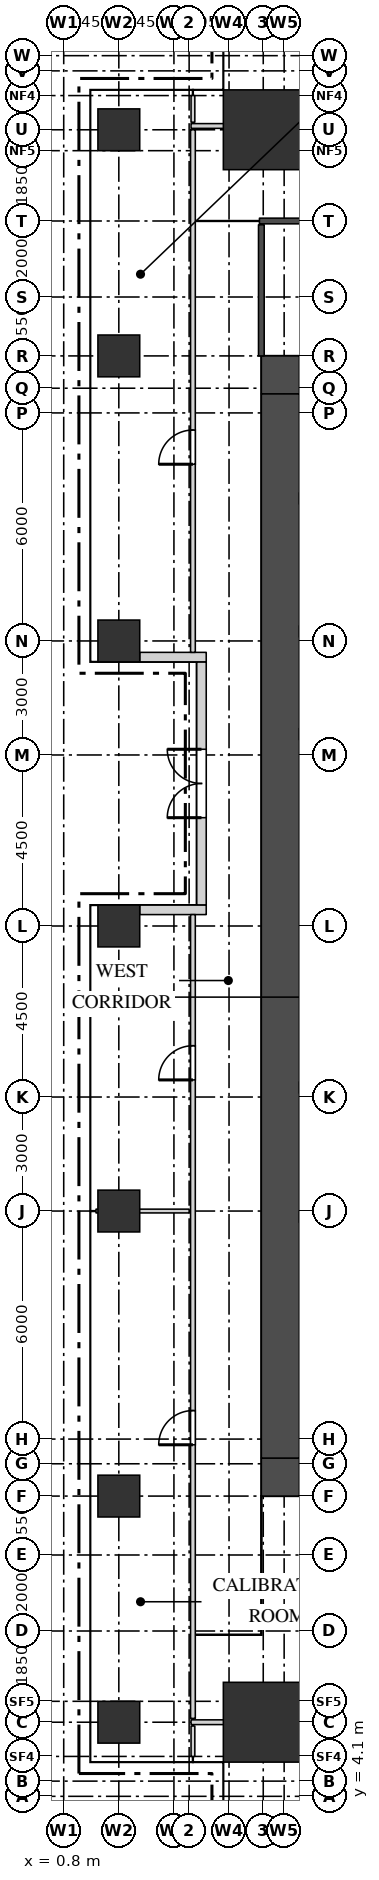
"""IFC4 building model, lengths in metres.
Left out: names, types, materials, properties, quantities, classifications, styles, units other than length and angle.
Written with IfcOpenShell. Run it as: python <this file> out.ifc"""

import sys

from ifc_helpers import new_model, si_unit, direction, frame, frame_2d, origin, origin_2d, place, context, subcontext, project, spatial, rectangle, extrude, source, transform, mapped, element, fill, save


model = new_model("IFC4")
c1 = context("Model", 3, precision=1e-05, world=origin(), true_north=direction((0.0, 1.0)))
c2 = subcontext(c1, "Body", "Model", "MODEL_VIEW")
j1 = project(units=[si_unit("LENGTHUNIT", "METRE"), si_unit("PLANEANGLEUNIT", "RADIAN")], contexts=[c1])
p1 = place(None, origin())
s1 = spatial("IfcSite", under=j1, at=p1, CompositionType="ELEMENT")
p2 = place(p1, origin())
s2 = spatial("IfcBuilding", under=s1, at=p2, CompositionType="ELEMENT")
p3 = place(p2, frame((0.0, 0.0, 127.9)))
s3 = spatial("IfcBuildingStorey", under=s2, at=p3, CompositionType="ELEMENT", Elevation=127.9)
m1 = source(origin(), c2, "Body", "SweptSolid", [
    extrude(rectangle(XDim=1.0, YDim=1.0, at=frame_2d((0.5, 0.0))), origin(), (0.0, 0.0, 1.0), 4.1),
])
for number, where, z_axis, x_axis in (
    (1, (6.0, 41.5, 0.0), (0.0, 0.0, 1.0), (1.0, 0.0, 0.0)),
    (2, (6.0, 12.5, 0.0), (0.0, 0.0, 1.0), (1.0, 0.0, 0.0)),
):
    element("IfcWall", number, at=place(p3, frame(where, z_axis=z_axis, x_axis=x_axis)), inside=s3, PredefinedType="SHEAR", context=c2, shape_type="MappedRepresentation", body=[
        mapped(m1, transform((0.0, 0.0, 0.0))),
    ])
m2 = source(origin(), c2, "Body", "SweptSolid", [
    extrude(rectangle(XDim=28.0, YDim=1.0, at=frame_2d((14.0, 0.0))), origin(), (0.0, 0.0, 1.0), 4.1),
])
p4 = place(p3, frame((6.5, 13.0, 0.0), z_axis=(0.0, 0.0, 1.0), x_axis=(0.0, 1.0, 0.0)))
e3 = element("IfcWall", 3, at=p4, inside=s3, PredefinedType="SHEAR", context=c2, shape_type="MappedRepresentation", body=[
    mapped(m2, transform((0.0, 0.0, 0.0))),
])
m3 = source(origin(), c2, "Body", "SweptSolid", [
    extrude(rectangle(XDim=2.1, YDim=2.1, at=origin_2d()), origin(), (0.0, 0.0, 1.0), 4.4),
])
for number, where, z_axis, x_axis in (
    (4, (6.05, 47.95, 0.0), (0.0, 0.0, 1.0), (1.0, 0.0, 0.0)),
    (5, (6.05, 6.05, 0.0), (0.0, 0.0, 1.0), (1.0, 0.0, 0.0)),
):
    element("IfcColumn", number, at=place(p3, frame(where, z_axis=z_axis, x_axis=x_axis)), inside=s3, PredefinedType="COLUMN", context=c2, shape_type="MappedRepresentation", body=[
        mapped(m3, transform((0.0, 0.0, 0.0))),
    ])
m4 = source(origin(), c2, "Body", "SweptSolid", [
    extrude(rectangle(XDim=1.1, YDim=1.1, at=origin_2d()), origin(), (0.0, 0.0, 1.0), 4.1),
])
for number, where, z_axis, x_axis in (
    (6, (2.25, 6.05, 0.0), (0.0, 0.0, 1.0), (1.0, 0.0, 0.0)),
    (7, (2.25, 12.0, 0.0), (0.0, 0.0, 1.0), (1.0, 0.0, 0.0)),
    (8, (2.25, 19.5, 0.0), (0.0, 0.0, 1.0), (1.0, 0.0, 0.0)),
    (9, (2.25, 27.0, 0.0), (0.0, 0.0, 1.0), (1.0, 0.0, 0.0)),
    (10, (2.25, 34.5, 0.0), (0.0, 0.0, 1.0), (1.0, 0.0, 0.0)),
    (11, (2.25, 42.0, 0.0), (0.0, 0.0, 1.0), (1.0, 0.0, 0.0)),
    (12, (2.25, 47.95, 0.0), (0.0, 0.0, 1.0), (1.0, 0.0, 0.0)),
):
    element("IfcColumn", number, at=place(p3, frame(where, z_axis=z_axis, x_axis=x_axis)), inside=s3, PredefinedType="COLUMN", context=c2, shape_type="MappedRepresentation", body=[
        mapped(m4, transform((0.0, 0.0, 0.0))),
    ])
m5 = source(origin(), c2, "Body", "SweptSolid", [
    extrude(rectangle(XDim=6.4, YDim=0.25, at=frame_2d((3.2, 0.0))), origin(), (0.0, 0.0, 1.0), 3.5),
])
p5 = place(p3, frame((4.425, 27.55, 0.0), z_axis=(0.0, 0.0, 1.0), x_axis=(0.0, 1.0, 0.0)))
e13 = element("IfcWall", 13, at=p5, inside=s3, PredefinedType="SOLIDWALL", context=c2, shape_type="MappedRepresentation", body=[
    mapped(m5, transform((0.0, 0.0, 0.0))),
])
m6 = source(origin(), c2, "Body", "SweptSolid", [
    extrude(rectangle(XDim=1.65, YDim=2.4, at=frame_2d((0.825, 1.2))), frame((0.0, 0.135, 0.0), z_axis=(0.0, -1.0, 0.0), x_axis=(1.0, 0.0, 0.0)), (0.0, 0.0, 1.0), 0.27),
])
p6 = place(p5, frame((0.35, 0.0, 0.0)))
e14 = element("IfcOpeningElement", 14, at=p6, cuts=e13, PredefinedType="OPENING", context=c2, shape_type="MappedRepresentation", body=[
    mapped(m6, transform((0.0, 0.0, 0.0))),
])
p7 = place(p5, frame((4.4, 0.0, 0.0)))
e15 = element("IfcOpeningElement", 15, at=p7, cuts=e13, PredefinedType="OPENING", context=c2, shape_type="MappedRepresentation", body=[
    mapped(m6, transform((0.0, 0.0, 0.0))),
])
m7 = source(origin(), c2, "Body", "SweptSolid", [
    extrude(rectangle(XDim=1.8, YDim=2.4, at=frame_2d((0.9, 1.2))), frame((0.0, 0.135, 0.0), z_axis=(0.0, -1.0, 0.0), x_axis=(1.0, 0.0, 0.0)), (0.0, 0.0, 1.0), 0.27),
])
p8 = place(p5, frame((2.3, 0.0, 0.0)))
e16 = element("IfcOpeningElement", 16, at=p8, cuts=e13, PredefinedType="OPENING", context=c2, shape_type="MappedRepresentation", body=[
    mapped(m7, transform((0.0, 0.0, 0.0))),
])
m8 = source(origin(), c2, "Body", "SweptSolid", [
    extrude(rectangle(XDim=1.75, YDim=0.25, at=frame_2d((0.875, 0.0))), origin(), (0.0, 0.0, 1.0), 3.5),
])
for number, where, z_axis, x_axis in (
    (17, (2.8, 27.425, 0.0), (0.0, 0.0, 1.0), (1.0, 0.0, 0.0)),
    (18, (2.8, 34.075, 0.0), (0.0, 0.0, 1.0), (1.0, 0.0, 0.0)),
):
    element("IfcWall", number, at=place(p3, frame(where, z_axis=z_axis, x_axis=x_axis)), inside=s3, PredefinedType="SOLIDWALL", context=c2, shape_type="MappedRepresentation", body=[
        mapped(m8, transform((0.0, 0.0, 0.0))),
    ])
m9 = source(origin(), c2, "Body", "SweptSolid", [
    extrude(rectangle(XDim=0.8, YDim=0.1, at=frame_2d((0.4, 0.0))), origin(), (0.0, 0.0, 1.0), 4.2),
])
p9 = place(p3, frame((4.2, 5.15, 0.0), z_axis=(0.0, 0.0, 1.0), x_axis=(0.0, 1.0, 0.0)))
e19 = element("IfcWall", 19, at=p9, inside=s3, PredefinedType="PARTITIONING", context=c2, shape_type="MappedRepresentation", body=[
    mapped(m9, transform((0.0, 0.0, 0.0))),
])
m10 = source(origin(), c2, "Body", "SweptSolid", [
    extrude(rectangle(XDim=22.3, YDim=0.125, at=frame_2d((11.15, 0.0))), origin(), (0.0, 0.0, 1.0), 3.55),
])
p10 = place(p3, frame((4.15, 6.05, 0.0), z_axis=(0.0, 0.0, 1.0), x_axis=(1.0, 0.0, 0.0)))
e20 = element("IfcWall", 20, at=p10, inside=s3, PredefinedType="PARTITIONING", context=c2, shape_type="MappedRepresentation", body=[
    mapped(m10, transform((0.0, 0.0, 0.0))),
])
m11 = source(origin(), c2, "Body", "SweptSolid", [
    extrude(rectangle(XDim=0.9, YDim=2.1, at=frame_2d((0.45, 1.05))), frame((0.0, 0.073, 0.0), z_axis=(0.0, -1.0, 0.0), x_axis=(1.0, 0.0, 0.0)), (0.0, 0.0, 1.0), 0.145),
])
p11 = place(p10, frame((10.7, 0.0, 0.0)))
e21 = element("IfcOpeningElement", 21, at=p11, cuts=e20, PredefinedType="OPENING", context=c2, shape_type="MappedRepresentation", body=[
    mapped(m11, transform((0.0, 0.0, 0.0))),
])
m12 = source(origin(), c2, "Body", "SweptSolid", [
    extrude(rectangle(XDim=21.15, YDim=0.125, at=frame_2d((10.575, 0.0))), origin(), (0.0, 0.0, 1.0), 4.2),
])
p12 = place(p3, frame((4.2, 6.15, 0.0), z_axis=(0.0, 0.0, 1.0), x_axis=(0.0, 1.0, 0.0)))
e22 = element("IfcWall", 22, at=p12, inside=s3, PredefinedType="PARTITIONING", context=c2, shape_type="MappedRepresentation", body=[
    mapped(m12, transform((0.0, 0.0, 0.0))),
])
p13 = place(p12, frame((7.2, 0.0, 0.0)))
e23 = element("IfcOpeningElement", 23, at=p13, cuts=e22, PredefinedType="OPENING", context=c2, shape_type="MappedRepresentation", body=[
    mapped(m11, transform((0.0, 0.0, 0.0))),
])
p14 = place(p12, frame((16.8, 0.0, 0.0)))
e24 = element("IfcOpeningElement", 24, at=p14, cuts=e22, PredefinedType="OPENING", context=c2, shape_type="MappedRepresentation", body=[
    mapped(m11, transform((0.0, 0.0, 0.0))),
])
m13 = source(origin(), c2, "Body", "SweptSolid", [
    extrude(rectangle(XDim=2.45, YDim=0.1, at=frame_2d((1.225, 0.0))), origin(), (0.0, 0.0, 1.0), 4.2),
])
p15 = place(p3, frame((1.65, 19.5, 0.0), z_axis=(0.0, 0.0, 1.0), x_axis=(1.0, 0.0, 0.0)))
e25 = element("IfcWall", 25, at=p15, inside=s3, PredefinedType="PARTITIONING", context=c2, shape_type="MappedRepresentation", body=[
    mapped(m13, transform((0.0, 0.0, 0.0))),
])
m14 = source(origin(), c2, "Body", "SweptSolid", [
    extrude(rectangle(XDim=13.75, YDim=0.125, at=frame_2d((6.875, 0.0))), origin(), (0.0, 0.0, 1.0), 4.2),
])
p16 = place(p3, frame((4.2, 34.2, 0.0), z_axis=(0.0, 0.0, 1.0), x_axis=(0.0, 1.0, 0.0)))
e26 = element("IfcWall", 26, at=p16, inside=s3, PredefinedType="PARTITIONING", context=c2, shape_type="MappedRepresentation", body=[
    mapped(m14, transform((0.0, 0.0, 0.0))),
])
p17 = place(p16, frame((4.95, 0.0, 0.0)))
e27 = element("IfcOpeningElement", 27, at=p17, cuts=e26, PredefinedType="OPENING", context=c2, shape_type="MappedRepresentation", body=[
    mapped(m11, transform((0.0, 0.0, 0.0))),
])
m15 = source(origin(), c2, "Body", "SweptSolid", [
    extrude(rectangle(XDim=3.45, YDim=0.15, at=frame_2d((1.725, 0.0))), origin(), (0.0, 0.0, 1.0), 4.2),
])
p18 = place(p3, frame((6.0, 42.0, 0.0), z_axis=(0.0, 0.0, 1.0), x_axis=(0.0, 1.0, 0.0)))
e28 = element("IfcWall", 28, at=p18, inside=s3, PredefinedType="PARTITIONING", context=c2, shape_type="MappedRepresentation", body=[
    mapped(m15, transform((0.0, 0.0, 0.0))),
])
m16 = source(origin(), c2, "Body", "SweptSolid", [
    extrude(rectangle(XDim=7.95, YDim=0.15, at=frame_2d((3.975, 0.0))), origin(), (0.0, 0.0, 1.0), 4.2),
])
p19 = place(p3, frame((5.95, 45.55, 0.0), z_axis=(0.0, 0.0, 1.0), x_axis=(1.0, 0.0, 0.0)))
e29 = element("IfcWall", 29, at=p19, inside=s3, PredefinedType="PARTITIONING", context=c2, shape_type="MappedRepresentation", body=[
    mapped(m16, transform((0.0, 0.0, 0.0))),
])
m17 = source(origin(), c2, "Body", "SweptSolid", [
    extrude(rectangle(XDim=0.9, YDim=2.1, at=frame_2d((0.45, 1.05))), frame((0.0, 0.085, 0.0), z_axis=(0.0, -1.0, 0.0), x_axis=(1.0, 0.0, 0.0)), (0.0, 0.0, 1.0), 0.17),
])
p20 = place(p19, frame((3.55, 0.0, 0.0)))
e30 = element("IfcOpeningElement", 30, at=p20, cuts=e29, PredefinedType="OPENING", context=c2, shape_type="MappedRepresentation", body=[
    mapped(m17, transform((0.0, 0.0, 0.0))),
])
m18 = source(origin(), c2, "Body", "SweptSolid", [
    extrude(rectangle(XDim=42.2, YDim=0.125, at=frame_2d((21.1, 0.0))), origin(), (0.0, 0.0, 1.0), 3.55),
])
p21 = place(p3, frame((4.15, 48.05, 0.0), z_axis=(0.0, 0.0, 1.0), x_axis=(1.0, 0.0, 0.0)))
e31 = element("IfcWall", 31, at=p21, inside=s3, PredefinedType="PARTITIONING", context=c2, shape_type="MappedRepresentation", body=[
    mapped(m18, transform((0.0, 0.0, 0.0))),
])
p22 = place(p21, frame((11.0, 0.0, 0.0)))
e32 = element("IfcOpeningElement", 32, at=p22, cuts=e31, PredefinedType="OPENING", context=c2, shape_type="MappedRepresentation", body=[
    mapped(m11, transform((0.0, 0.0, 0.0))),
])
p23 = place(p21, frame((32.1, 0.0, 0.0)))
e33 = element("IfcOpeningElement", 33, at=p23, cuts=e31, PredefinedType="OPENING", context=c2, shape_type="MappedRepresentation", body=[
    mapped(m11, transform((0.0, 0.0, 0.0))),
])
m19 = source(origin(), c2, "Body", "SweptSolid", [
    extrude(rectangle(XDim=0.7, YDim=0.1, at=frame_2d((0.35, 0.0))), origin(), (0.0, 0.0, 1.0), 4.2),
])
p24 = place(p3, frame((4.2, 48.15, 0.0), z_axis=(0.0, 0.0, 1.0), x_axis=(0.0, 1.0, 0.0)))
e34 = element("IfcWall", 34, at=p24, inside=s3, PredefinedType="PARTITIONING", context=c2, shape_type="MappedRepresentation", body=[
    mapped(m19, transform((0.0, 0.0, 0.0))),
])
m20 = source(origin(), c2, "Body", "SweptSolid", [
    extrude(rectangle(XDim=1.65, YDim=2.4, at=frame_2d((0.825, 1.2))), frame((0.0, 0.03, 0.0), z_axis=(0.0, -1.0, 0.0), x_axis=(1.0, 0.0, 0.0)), (0.0, 0.0, 1.0), 0.06),
])
p25 = place(p6, origin())
e35 = element("IfcWindow", 35, at=p25, inside=s3, PartitioningType="SINGLE_PANEL", PredefinedType="WINDOW", context=c2, shape_type="MappedRepresentation", body=[
    mapped(m20, transform((0.0, 0.0, 0.0))),
])
fill(e14, e35)
p26 = place(p7, origin())
e36 = element("IfcWindow", 36, at=p26, inside=s3, PartitioningType="SINGLE_PANEL", PredefinedType="WINDOW", context=c2, shape_type="MappedRepresentation", body=[
    mapped(m20, transform((0.0, 0.0, 0.0))),
])
fill(e15, e36)
m21 = source(origin(), c2, "Body", "SweptSolid", [
    extrude(rectangle(XDim=1.8, YDim=2.4, at=frame_2d((0.9, 1.2))), frame((0.0, 0.025, 0.0), z_axis=(0.0, -1.0, 0.0), x_axis=(1.0, 0.0, 0.0)), (0.0, 0.0, 1.0), 0.05),
])
p27 = place(p8, origin())
e37 = element("IfcDoor", 37, at=p27, inside=s3, OperationType="DOUBLE_DOOR_DOUBLE_SWING", PredefinedType="DOOR", context=c2, shape_type="MappedRepresentation", body=[
    mapped(m21, transform((0.0, 0.0, 0.0))),
])
fill(e16, e37)
m22 = source(origin(), c2, "Body", "SweptSolid", [
    extrude(rectangle(XDim=0.9, YDim=2.1, at=frame_2d((0.45, 1.05))), frame((0.0, 0.025, 0.0), z_axis=(0.0, -1.0, 0.0), x_axis=(1.0, 0.0, 0.0)), (0.0, 0.0, 1.0), 0.05),
])
p28 = place(p13, origin())
e38 = element("IfcDoor", 38, at=p28, inside=s3, OperationType="SINGLE_SWING_RIGHT", PredefinedType="DOOR", context=c2, shape_type="MappedRepresentation", body=[
    mapped(m22, transform((0.0, 0.0, 0.0))),
])
fill(e23, e38)
p29 = place(p14, origin())
e39 = element("IfcDoor", 39, at=p29, inside=s3, OperationType="SINGLE_SWING_RIGHT", PredefinedType="DOOR", context=c2, shape_type="MappedRepresentation", body=[
    mapped(m22, transform((0.0, 0.0, 0.0))),
])
fill(e24, e39)
p30 = place(p17, origin())
e40 = element("IfcDoor", 40, at=p30, inside=s3, OperationType="SINGLE_SWING_RIGHT", PredefinedType="DOOR", context=c2, shape_type="MappedRepresentation", body=[
    mapped(m22, transform((0.0, 0.0, 0.0))),
])
fill(e27, e40)
save(model, sys.argv[1])
